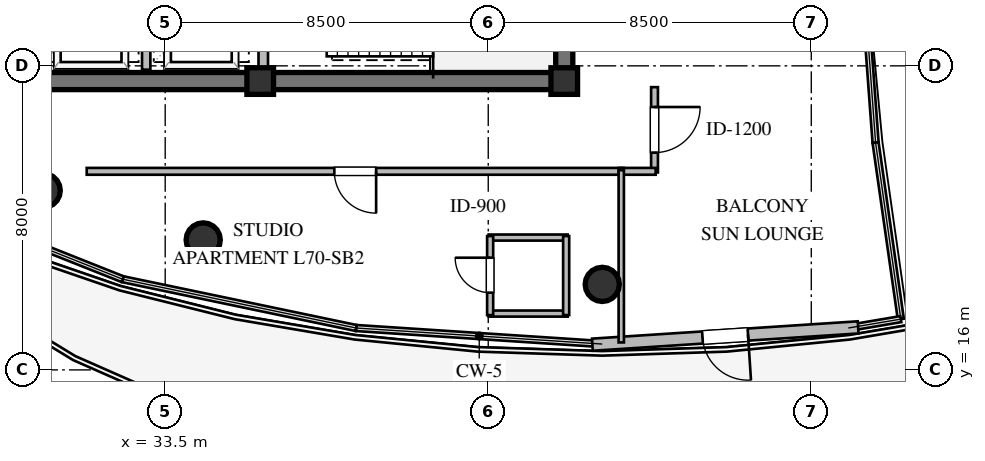
"""IFC4 building model, lengths in metres.
Left out: names, types, materials, properties, quantities, classifications, styles, units other than length and angle.
Written with IfcOpenShell. Run it as: python <this file> out.ifc"""

import sys

from ifc_helpers import new_model, si_unit, direction, frame, frame_2d, origin, origin_2d, place, context, subcontext, project, spatial, rectangle, circle, extrude, element, fill, save


model = new_model("IFC4")
c1 = context("Model", 3, precision=1e-05, world=origin(), true_north=direction((0.0, 1.0)))
c2 = subcontext(c1, "Body", "Model", "MODEL_VIEW")
j1 = project(units=[si_unit("LENGTHUNIT", "METRE"), si_unit("PLANEANGLEUNIT", "RADIAN")], contexts=[c1])
p1 = place(None, origin())
s1 = spatial("IfcSite", under=j1, at=p1, CompositionType="ELEMENT")
p2 = place(p1, origin())
s2 = spatial("IfcBuilding", under=s1, at=p2, CompositionType="ELEMENT")
p3 = place(p2, frame((0.0, 0.0, 266.2)))
s3 = spatial("IfcBuildingStorey", under=s2, at=p3, CompositionType="ELEMENT", Elevation=266.2)
p4 = place(p3, frame((21.775, 23.6, 0.0), z_axis=(0.0, 0.0, 1.0), x_axis=(1.0, 0.0, 0.0)))
e1 = element("IfcWall", 1, at=p4, inside=s3, PredefinedType="SHEAR", context=c2, shape_type="SweptSolid", body=[
    extrude(rectangle(XDim=22.45, YDim=0.45, at=frame_2d((11.225, 0.0))), origin(), (0.0, 0.0, 1.0), 3.56),
])
p5 = place(p3, frame((44.0, 23.825, 0.0), z_axis=(0.0, 0.0, 1.0), x_axis=(0.0, 1.0, 0.0)))
e2 = element("IfcWall", 2, at=p5, inside=s3, PredefinedType="SHEAR", context=c2, shape_type="SweptSolid", body=[
    extrude(rectangle(XDim=12.35, YDim=0.45, at=frame_2d((6.175, 0.0))), origin(), (0.0, 0.0, 1.0), 3.56),
])
p6 = place(p5, frame((8.675, 0.0, 0.0)))
e3 = element("IfcOpeningElement", 3, at=p6, cuts=e2, PredefinedType="OPENING", context=c2, shape_type="SweptSolid", body=[
    extrude(rectangle(XDim=1.5, YDim=2.15, at=frame_2d((0.75, 1.075))), frame((0.0, 0.235, 0.0), z_axis=(0.0, -1.0, 0.0), x_axis=(1.0, 0.0, 0.0)), (0.0, 0.0, 1.0), 0.47),
])
for number, where, z_axis, x_axis in (
    (4, (36.0, 23.6, 0.0), (0.0, 0.0, 1.0), (1.0, 0.0, 0.0)),
    (5, (44.0, 23.6, 0.0), (0.0, 0.0, 1.0), (1.0, 0.0, 0.0)),
):
    element("IfcColumn", number, at=place(p3, frame(where, z_axis=z_axis, x_axis=x_axis)), inside=s3, PredefinedType="COLUMN", context=c2, shape_type="SweptSolid", body=[
        extrude(rectangle(XDim=0.7, YDim=0.7, at=origin_2d()), origin(), (0.0, 0.0, 1.0), 3.8),
    ])
for number, where, z_axis, x_axis in (
    (6, (30.29, 20.72, 0.0), (0.0, 0.0, 1.0), (1.0, 0.0, 0.0)),
    (7, (34.5, 19.42, 0.0), (0.0, 0.0, 1.0), (1.0, 0.0, 0.0)),
    (8, (45.0, 18.25, 0.0), (0.0, 0.0, 1.0), (1.0, 0.0, 0.0)),
):
    element("IfcColumn", number, at=place(p3, frame(where, z_axis=z_axis, x_axis=x_axis)), inside=s3, PredefinedType="COLUMN", context=c2, shape_type="SweptSolid", body=[
        extrude(circle(Radius=0.45, at=origin_2d()), origin(), (0.0, 0.0, 1.0), 3.8),
    ])
p7 = place(p3, frame((51.733, 17.119, 0.0), z_axis=(0.0, 0.0, 1.0), x_axis=(-0.997881827293, -0.065052738278, 0.0)))
e9 = element("IfcWall", 9, at=p7, inside=s3, PredefinedType="STANDARD", context=c2, shape_type="SweptSolid", body=[
    extrude(rectangle(XDim=7.007, YDim=0.32, at=frame_2d((3.503, 0.0))), origin(), (0.0, 0.0, 1.0), 3.56),
])
p8 = place(p7, frame((2.904, 0.0, 0.0)))
e10 = element("IfcOpeningElement", 10, at=p8, cuts=e9, PredefinedType="OPENING", context=c2, shape_type="SweptSolid", body=[
    extrude(rectangle(XDim=1.2, YDim=2.15, at=frame_2d((0.6, 1.075))), frame((0.0, 0.17, 0.0), z_axis=(0.0, -1.0, 0.0), x_axis=(1.0, 0.0, 0.0)), (0.0, 0.0, 1.0), 0.34),
])
p9 = place(p3, frame((36.08, 23.9, 0.0), z_axis=(0.0, 0.0, 1.0), x_axis=(0.0, 1.0, 0.0)))
e11 = element("IfcWall", 11, at=p9, inside=s3, PredefinedType="SOLIDWALL", context=c2, shape_type="SweptSolid", body=[
    extrude(rectangle(XDim=5.4, YDim=0.25, at=frame_2d((2.7, 0.0))), origin(), (0.0, 0.0, 1.0), 3.56),
])
p10 = place(p9, frame((3.421, 0.0, 0.0)))
e12 = element("IfcOpeningElement", 12, at=p10, cuts=e11, PredefinedType="OPENING", context=c2, shape_type="SweptSolid", body=[
    extrude(rectangle(XDim=1.15, YDim=2.1, at=frame_2d((0.575, 1.05))), frame((0.0, 0.135, 0.0), z_axis=(0.0, -1.0, 0.0), x_axis=(1.0, 0.0, 0.0)), (0.0, 0.0, 1.0), 0.27),
])
p11 = place(p3, frame((33.0, 23.9, 0.0), z_axis=(0.0, 0.0, 1.0), x_axis=(0.0, 1.0, 0.0)))
e13 = element("IfcWall", 13, at=p11, inside=s3, PredefinedType="SOLIDWALL", context=c2, shape_type="SweptSolid", body=[
    extrude(rectangle(XDim=2.72, YDim=0.22, at=frame_2d((1.36, 0.0))), origin(), (0.0, 0.0, 1.0), 3.56),
])
for number, where, z_axis, x_axis in (
    (14, (42.01, 17.482, 0.0), (0.0, 0.0, 1.0), (1.0, 0.0, 0.0)),
    (15, (42.01, 19.482, 0.0), (0.0, 0.0, 1.0), (1.0, 0.0, 0.0)),
):
    element("IfcWall", number, at=place(p3, frame(where, z_axis=z_axis, x_axis=x_axis)), inside=s3, PredefinedType="PLUMBINGWALL", context=c2, shape_type="SweptSolid", body=[
        extrude(rectangle(XDim=2.08, YDim=0.16, at=frame_2d((1.04, 0.0))), origin(), (0.0, 0.0, 1.0), 3.56),
    ])
p12 = place(p3, frame((42.05, 17.442, 0.0), z_axis=(0.0, 0.0, 1.0), x_axis=(0.0, 1.0, 0.0)))
e16 = element("IfcWall", 16, at=p12, inside=s3, PredefinedType="PLUMBINGWALL", context=c2, shape_type="SweptSolid", body=[
    extrude(rectangle(XDim=2.08, YDim=0.16, at=frame_2d((1.04, 0.0))), origin(), (0.0, 0.0, 1.0), 3.56),
])
p13 = place(p12, frame((0.59, 0.0, 0.0)))
e17 = element("IfcOpeningElement", 17, at=p13, cuts=e16, PredefinedType="OPENING", context=c2, shape_type="SweptSolid", body=[
    extrude(rectangle(XDim=0.92, YDim=2.1, at=frame_2d((0.46, 1.05))), frame((0.0, 0.09, 0.0), z_axis=(0.0, -1.0, 0.0), x_axis=(1.0, 0.0, 0.0)), (0.0, 0.0, 1.0), 0.18),
])
p14 = place(p3, frame((44.05, 17.442, 0.0), z_axis=(0.0, 0.0, 1.0), x_axis=(0.0, 1.0, 0.0)))
e18 = element("IfcWall", 18, at=p14, inside=s3, PredefinedType="PLUMBINGWALL", context=c2, shape_type="SweptSolid", body=[
    extrude(rectangle(XDim=2.08, YDim=0.16, at=frame_2d((1.04, 0.0))), origin(), (0.0, 0.0, 1.0), 3.56),
])
p15 = place(p3, frame((45.565, 21.225, 0.0), z_axis=(0.0, 0.0, 1.0), x_axis=(-1.0, 0.0, 0.0)))
e19 = element("IfcWall", 19, at=p15, inside=s3, PredefinedType="PARTITIONING", context=c2, shape_type="SweptSolid", body=[
    extrude(rectangle(XDim=14.13, YDim=0.18, at=frame_2d((7.065, 0.0))), origin(), (0.0, 0.0, 1.0), 3.196),
])
p16 = place(p15, frame((6.515, 0.0, 0.0)))
e20 = element("IfcOpeningElement", 20, at=p16, cuts=e19, PredefinedType="OPENING", context=c2, shape_type="SweptSolid", body=[
    extrude(rectangle(XDim=1.1, YDim=2.1, at=frame_2d((0.55, 1.05))), frame((0.0, 0.1, 0.0), z_axis=(0.0, -1.0, 0.0), x_axis=(1.0, 0.0, 0.0)), (0.0, 0.0, 1.0), 0.2),
])
p17 = place(p3, frame((46.375, 23.44, 0.0), z_axis=(0.0, 0.0, 1.0), x_axis=(0.0, -1.0, 0.0)))
e21 = element("IfcWall", 21, at=p17, inside=s3, PredefinedType="PARTITIONING", context=c2, shape_type="SweptSolid", body=[
    extrude(rectangle(XDim=2.245, YDim=0.18, at=frame_2d((1.123, 0.0))), origin(), (0.0, 0.0, 1.0), 3.56),
])
p18 = place(p17, frame((0.523, 0.0, 0.0)))
e22 = element("IfcOpeningElement", 22, at=p18, cuts=e21, PredefinedType="OPENING", context=c2, shape_type="SweptSolid", body=[
    extrude(rectangle(XDim=1.2, YDim=2.15, at=frame_2d((0.6, 1.075))), frame((0.0, 0.1, 0.0), z_axis=(0.0, -1.0, 0.0), x_axis=(1.0, 0.0, 0.0)), (0.0, 0.0, 1.0), 0.2),
])
p19 = place(p3, frame((46.405, 21.225, 0.0), z_axis=(0.0, 0.0, 1.0), x_axis=(-1.0, 0.0, 0.0)))
e23 = element("IfcWall", 23, at=p19, inside=s3, PredefinedType="PARTITIONING", context=c2, shape_type="SweptSolid", body=[
    extrude(rectangle(XDim=0.97, YDim=0.18, at=frame_2d((0.485, 0.0))), origin(), (0.0, 0.0, 1.0), 3.196),
])
p20 = place(p3, frame((45.5, 21.255, 0.0), z_axis=(0.0, 0.0, 1.0), x_axis=(0.0, -1.0, 0.0)))
e24 = element("IfcWall", 24, at=p20, inside=s3, PredefinedType="PARTITIONING", context=c2, shape_type="SweptSolid", body=[
    extrude(rectangle(XDim=4.532, YDim=0.14, at=frame_2d((2.266, 0.0))), origin(), (0.0, 0.0, 1.0), 3.006),
])
p21 = place(p8, origin())
e25 = element("IfcDoor", 25, at=p21, inside=s3, OperationType="SINGLE_SWING_LEFT", PredefinedType="DOOR", context=c2, shape_type="SweptSolid", body=[
    extrude(rectangle(XDim=1.2, YDim=2.15, at=frame_2d((0.6, 1.075))), frame((0.0, 0.025, 0.0), z_axis=(0.0, -1.0, 0.0), x_axis=(1.0, 0.0, 0.0)), (0.0, 0.0, 1.0), 0.05),
])
fill(e10, e25)
p22 = place(p13, origin())
e26 = element("IfcDoor", 26, at=p22, inside=s3, OperationType="SINGLE_SWING_RIGHT", PredefinedType="DOOR", context=c2, shape_type="SweptSolid", body=[
    extrude(rectangle(XDim=0.92, YDim=2.1, at=frame_2d((0.46, 1.05))), frame((0.0, 0.025, 0.0), z_axis=(0.0, -1.0, 0.0), x_axis=(1.0, 0.0, 0.0)), (0.0, 0.0, 1.0), 0.05),
])
fill(e17, e26)
p23 = place(p16, origin())
e27 = element("IfcDoor", 27, at=p23, inside=s3, OperationType="SINGLE_SWING_LEFT", PredefinedType="DOOR", context=c2, shape_type="SweptSolid", body=[
    extrude(rectangle(XDim=1.1, YDim=2.1, at=frame_2d((0.55, 1.05))), frame((0.0, 0.025, 0.0), z_axis=(0.0, -1.0, 0.0), x_axis=(1.0, 0.0, 0.0)), (0.0, 0.0, 1.0), 0.05),
])
fill(e20, e27)
p24 = place(p18, origin())
e28 = element("IfcDoor", 28, at=p24, inside=s3, OperationType="SINGLE_SWING_LEFT", PredefinedType="DOOR", context=c2, shape_type="SweptSolid", body=[
    extrude(rectangle(XDim=1.2, YDim=2.15, at=frame_2d((0.6, 1.075))), frame((0.0, 0.025, 0.0), z_axis=(0.0, -1.0, 0.0), x_axis=(1.0, 0.0, 0.0)), (0.0, 0.0, 1.0), 0.05),
])
fill(e22, e28)
save(model, sys.argv[1])
